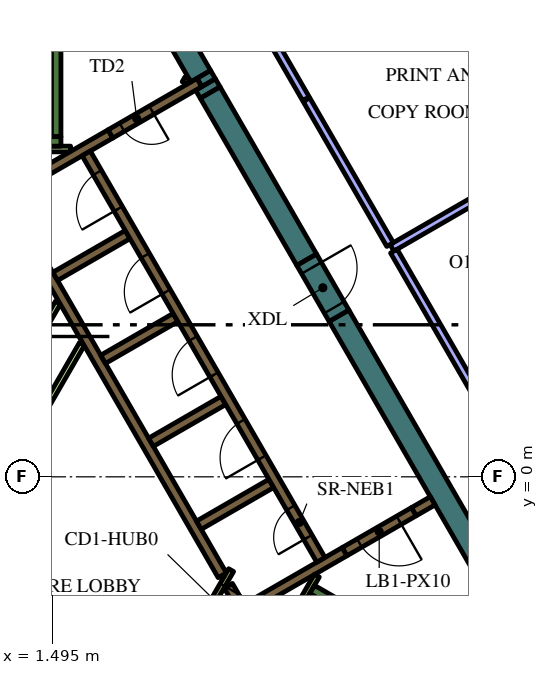
"""IFC4 building model, lengths in metres.
Left out: names, types, materials, properties, quantities, classifications, styles, units other than length and angle.
Written with IfcOpenShell. Run it as: python <this file> out.ifc"""

import sys

from ifc_helpers import new_model, si_unit, direction, frame, frame_2d, origin, place, context, subcontext, project, spatial, polyline, rectangle, outline, extrude, element, fill, save


model = new_model("IFC4")
c1 = context("Model", 3, precision=1e-05, world=origin(), true_north=direction((0.0, 1.0)))
c2 = subcontext(c1, "Body", "Model", "MODEL_VIEW")
j1 = project(units=[si_unit("LENGTHUNIT", "METRE"), si_unit("PLANEANGLEUNIT", "RADIAN")], contexts=[c1])
p1 = place(None, origin())
s1 = spatial("IfcSite", under=j1, at=p1, CompositionType="ELEMENT")
p2 = place(p1, origin())
s2 = spatial("IfcBuilding", under=s1, at=p2, CompositionType="ELEMENT")
p3 = place(p2, frame((0.0, 0.0, 304.8)))
s3 = spatial("IfcBuildingStorey", under=s2, at=p3, CompositionType="ELEMENT", Elevation=304.8)
p4 = place(p3, frame((9.042, 4.239, 0.0), z_axis=(0.0, 0.0, 1.0), x_axis=(0.500005785455, -0.866022063525, 0.0)))
e1 = element("IfcWall", 1, at=p4, inside=s3, PredefinedType="SOLIDWALL", context=c2, shape_type="SweptSolid", body=[
    extrude(rectangle(XDim=12.406, YDim=0.6, at=frame_2d((6.203, 0.0))), origin(), (0.0, 0.0, 1.0), 4.2),
])
p5 = place(p3, frame((5.529, 10.324, 0.0), z_axis=(0.0, 0.0, 1.0), x_axis=(0.499122205112, -0.866531606097, 0.0)))
e2 = element("IfcWall", 2, at=p5, inside=s3, PredefinedType="SOLIDWALL", context=c2, shape_type="SweptSolid", body=[
    extrude(rectangle(XDim=0.247, YDim=0.6, at=frame_2d((0.123, 0.0))), origin(), (0.0, 0.0, 1.0), 4.2),
])
p6 = place(p3, frame((1.989, 16.456, 0.0), z_axis=(0.0, 0.0, 1.0), x_axis=(0.499973159588, -0.866040899549, 0.0)))
e3 = element("IfcWall", 3, at=p6, inside=s3, PredefinedType="SOLIDWALL", context=c2, shape_type="SweptSolid", body=[
    extrude(rectangle(XDim=6.828, YDim=0.6, at=frame_2d((3.414, 0.0))), origin(), (0.0, 0.0, 1.0), 4.2),
])
p7 = place(p3, origin())
e4 = element("IfcWall", 4, at=p7, inside=s3, PredefinedType="SOLIDWALL", context=c2, shape_type="SweptSolid", body=[
    extrude(outline(polyline([(5.664, 10.691), (5.788, 10.476), (5.432, 10.271), (5.308, 10.486), (5.664, 10.691)])), origin(), (0.0, 0.0, 1.0), 4.2),
])
p8 = place(p3, frame((8.192, 5.711, 0.0), z_axis=(0.0, 0.0, 1.0), x_axis=(-0.500006836656, 0.866021456604, 0.0)))
e5 = element("IfcWall", 5, at=p8, inside=s3, PredefinedType="SOLIDWALL", context=c2, shape_type="SweptSolid", body=[
    extrude(rectangle(XDim=5.078, YDim=0.6, at=frame_2d((2.539, 0.0))), origin(), (0.0, 0.0, 1.0), 4.2),
])
p9 = place(p3, frame((8.334, -2.964, 0.0), z_axis=(0.0, 0.0, 1.0), x_axis=(0.866016039709, -0.500016218704, 0.0)))
e6 = element("IfcWall", 6, at=p9, inside=s3, PredefinedType="SOLIDWALL", context=c2, shape_type="SweptSolid", body=[
    extrude(rectangle(XDim=7.05, YDim=0.25, at=frame_2d((3.525, 0.0))), origin(), (0.0, 0.0, 1.0), 4.2),
])
p10 = place(p3, frame((8.168, -3.503, 0.0), z_axis=(0.0, 0.0, 1.0), x_axis=(0.49972245349, 0.866185586049, 0.0)))
e7 = element("IfcWall", 7, at=p10, inside=s3, PredefinedType="SOLIDWALL", context=c2, shape_type="SweptSolid", body=[
    extrude(rectangle(XDim=0.425, YDim=0.25, at=frame_2d((0.212, 0.0))), origin(), (0.0, 0.0, 1.0), 4.2),
])
p11 = place(p3, frame((1.6, 8.95, 0.0), z_axis=(0.0, 0.0, 1.0), x_axis=(0.0, 1.0, 0.0)))
e8 = element("IfcWall", 8, at=p11, inside=s3, PredefinedType="SOLIDWALL", context=c2, shape_type="SweptSolid", body=[
    extrude(rectangle(XDim=6.8, YDim=0.25, at=frame_2d((3.4, 0.0))), origin(), (0.0, 0.0, 1.0), 4.2),
])
p12 = place(p3, frame((1.05, 8.825, 0.0), z_axis=(0.0, 0.0, 1.0), x_axis=(1.0, 0.0, 0.0)))
e9 = element("IfcWall", 9, at=p12, inside=s3, PredefinedType="SOLIDWALL", context=c2, shape_type="SweptSolid", body=[
    extrude(rectangle(XDim=0.675, YDim=0.25, at=frame_2d((0.337, 0.0))), origin(), (0.0, 0.0, 1.0), 4.2),
])
p13 = place(p3, frame((9.19, -1.969, 0.0), z_axis=(0.0, 0.0, 1.0), x_axis=(-0.866057109641, -0.499945079824, 0.0)))
e10 = element("IfcWall", 10, at=p13, inside=s3, PredefinedType="SOLIDWALL", context=c2, shape_type="SweptSolid", body=[
    extrude(rectangle(XDim=3.291, YDim=0.25, at=frame_2d((1.646, 0.0))), origin(), (0.0, 0.0, 1.0), 4.2),
])
p14 = place(p3, frame((6.13, -2.867, 0.0), z_axis=(0.0, 0.0, 1.0), x_axis=(0.500160776593, -0.865932559475, 0.0)))
e11 = element("IfcWall", 11, at=p14, inside=s3, PredefinedType="SOLIDWALL", context=c2, shape_type="SweptSolid", body=[
    extrude(rectangle(XDim=0.627, YDim=0.25, at=frame_2d((0.313, 0.0))), origin(), (0.0, 0.0, 1.0), 4.2),
])
p15 = place(p3, frame((11.507, -0.631, 0.0), z_axis=(0.0, 0.0, 1.0), x_axis=(-0.866093731455, -0.499881634324, 0.0)))
e12 = element("IfcWall", 12, at=p15, inside=s3, PredefinedType="SOLIDWALL", context=c2, shape_type="SweptSolid", body=[
    extrude(rectangle(XDim=0.575, YDim=0.25, at=frame_2d((0.288, 0.0))), origin(), (0.0, 0.0, 1.0), 4.2),
])
p16 = place(p3, frame((3.028, 9.023, 0.0), z_axis=(0.0, 0.0, 1.0), x_axis=(-0.866036587186, -0.49998062928, 0.0)))
e13 = element("IfcWall", 13, at=p16, inside=s3, PredefinedType="SOLIDWALL", context=c2, shape_type="SweptSolid", body=[
    extrude(rectangle(XDim=3.384, YDim=0.25, at=frame_2d((1.692, 0.0))), origin(), (0.0, 0.0, 1.0), 4.2),
])
p17 = place(p3, frame((5.97, -2.591, 0.0), z_axis=(0.0, 0.0, 1.0), x_axis=(-0.499994469932, 0.866028596547, 0.0)))
e14 = element("IfcWall", 14, at=p17, inside=s3, PredefinedType="SOLIDWALL", context=c2, shape_type="SweptSolid", body=[
    extrude(rectangle(XDim=10.488, YDim=0.25, at=frame_2d((5.244, 0.0))), origin(), (0.0, 0.0, 1.0), 4.2),
])
p18 = place(p3, frame((1.574, 5.274, 0.0), z_axis=(0.0, 0.0, 1.0), x_axis=(0.866028486751, 0.499994660107, 0.0)))
e15 = element("IfcWall", 15, at=p18, inside=s3, PredefinedType="SOLIDWALL", context=c2, shape_type="SweptSolid", body=[
    extrude(rectangle(XDim=2.2, YDim=0.25, at=frame_2d((1.1, 0.0))), origin(), (0.0, 0.0, 1.0), 4.2),
])
for number, where, z_axis, x_axis in (
    (16, (2.834, 3.091, 0.0), (0.0, 0.0, 1.0), (0.866, 0.5, 0.0)),
    (17, (4.094, 0.909, 0.0), (0.0, 0.0, 1.0), (0.866, 0.5, 0.0)),
    (18, (5.354, -1.274, 0.0), (0.0, 0.0, 1.0), (0.866, 0.5, 0.0)),
):
    element("IfcWall", number, at=place(p3, frame(where, z_axis=z_axis, x_axis=x_axis)), inside=s3, PredefinedType="SOLIDWALL", context=c2, shape_type="SweptSolid", body=[
        extrude(rectangle(XDim=2.2, YDim=0.25, at=frame_2d((1.1, 0.0))), origin(), (0.0, 0.0, 1.0), 4.2),
    ])
p19 = place(p3, frame((1.05, 8.625, 0.0), z_axis=(0.0, 0.0, 1.0), x_axis=(1.0, 0.0, 0.0)))
e19 = element("IfcWall", 19, at=p19, inside=s3, PredefinedType="PARTITIONING", context=c2, shape_type="SweptSolid", body=[
    extrude(rectangle(XDim=0.929, YDim=0.15, at=frame_2d((0.464, 0.0))), origin(), (0.0, 0.0, 1.0), 3.55),
])
p20 = place(p3, frame((4.98, 10.358, 0.0), z_axis=(0.0, 0.0, 1.0), x_axis=(0.500640202437, 0.86565546709, 0.0)))
e20 = element("IfcWall", 20, at=p20, inside=s3, PredefinedType="PARTITIONING", context=c2, shape_type="SweptSolid", body=[
    extrude(rectangle(XDim=0.146, YDim=0.15, at=frame_2d((0.073, 0.0))), origin(), (0.0, 0.0, 1.0), 3.55),
])
p21 = place(p3, frame((8.459, -2.599, 0.0), z_axis=(0.0, 0.0, 1.0), x_axis=(-0.500041054325, -0.866001699761, 0.0)))
e21 = element("IfcWall", 21, at=p21, inside=s3, PredefinedType="PARTITIONING", context=c2, shape_type="SweptSolid", body=[
    extrude(rectangle(XDim=0.929, YDim=0.15, at=frame_2d((0.464, 0.0))), origin(), (0.0, 0.0, 1.0), 4.2),
])
p22 = place(p3, frame((-1.887, -3.718, 0.0), z_axis=(0.0, 0.0, 1.0), x_axis=(0.500005008002, 0.866022512394, 0.0)))
e22 = element("IfcWall", 22, at=p22, inside=s3, PredefinedType="PARTITIONING", context=c2, shape_type="SweptSolid", body=[
    extrude(rectangle(XDim=8.327, YDim=0.15, at=frame_2d((4.164, 0.0))), origin(), (0.0, 0.0, 1.0), 3.55),
])
p23 = place(p3, frame((-0.3, 1.212, 0.0), z_axis=(0.0, 0.0, 1.0), x_axis=(0.499963101113, 0.866046706318, 0.0)))
e23 = element("IfcWall", 23, at=p23, inside=s3, PredefinedType="PARTITIONING", context=c2, shape_type="SweptSolid", body=[
    extrude(rectangle(XDim=3.893, YDim=0.15, at=frame_2d((1.947, 0.0))), origin(), (0.0, 0.0, 1.0), 3.55),
])
p24 = place(p3, frame((8.565, -2.185, 0.0), z_axis=(0.0, 0.0, 1.0), x_axis=(-0.499997954832, 0.866026584559, 0.0)))
e24 = element("IfcWall", 24, at=p24, inside=s3, PredefinedType="SOLIDWALL", context=c2, shape_type="SweptSolid", body=[
    extrude(rectangle(XDim=12.35, YDim=0.25, at=frame_2d((6.175, 0.0))), origin(), (0.0, 0.0, 1.0), 4.2),
])
p25 = place(p24, frame((0.685, 0.0, 0.0)))
e25 = element("IfcOpeningElement", 25, at=p25, cuts=e24, PredefinedType="OPENING", context=c2, shape_type="SweptSolid", body=[
    extrude(rectangle(XDim=0.9, YDim=2.1, at=frame_2d((0.45, 1.05))), frame((0.0, 0.135, 0.0), z_axis=(0.0, -1.0, 0.0), x_axis=(1.0, 0.0, 0.0)), (0.0, 0.0, 1.0), 0.27),
])
p26 = place(p24, frame((3.105, 0.0, 0.0)))
e26 = element("IfcOpeningElement", 26, at=p26, cuts=e24, PredefinedType="OPENING", context=c2, shape_type="SweptSolid", body=[
    extrude(rectangle(XDim=1.1, YDim=2.1, at=frame_2d((0.55, 1.05))), frame((0.0, 0.135, 0.0), z_axis=(0.0, -1.0, 0.0), x_axis=(1.0, 0.0, 0.0)), (0.0, 0.0, 1.0), 0.27),
])
p27 = place(p24, frame((5.625, 0.0, 0.0)))
e27 = element("IfcOpeningElement", 27, at=p27, cuts=e24, PredefinedType="OPENING", context=c2, shape_type="SweptSolid", body=[
    extrude(rectangle(XDim=1.1, YDim=2.1, at=frame_2d((0.55, 1.05))), frame((0.0, 0.135, 0.0), z_axis=(0.0, -1.0, 0.0), x_axis=(1.0, 0.0, 0.0)), (0.0, 0.0, 1.0), 0.27),
])
p28 = place(p24, frame((8.145, 0.0, 0.0)))
e28 = element("IfcOpeningElement", 28, at=p28, cuts=e24, PredefinedType="OPENING", context=c2, shape_type="SweptSolid", body=[
    extrude(rectangle(XDim=1.1, YDim=2.1, at=frame_2d((0.55, 1.05))), frame((0.0, 0.135, 0.0), z_axis=(0.0, -1.0, 0.0), x_axis=(1.0, 0.0, 0.0)), (0.0, 0.0, 1.0), 0.27),
])
p29 = place(p24, frame((10.665, 0.0, 0.0)))
e29 = element("IfcOpeningElement", 29, at=p29, cuts=e24, PredefinedType="OPENING", context=c2, shape_type="SweptSolid", body=[
    extrude(rectangle(XDim=1.1, YDim=2.1, at=frame_2d((0.55, 1.05))), frame((0.0, 0.135, 0.0), z_axis=(0.0, -1.0, 0.0), x_axis=(1.0, 0.0, 0.0)), (0.0, 0.0, 1.0), 0.27),
])
p30 = place(p3, frame((5.366, 10.373, 0.0), z_axis=(0.0, 0.0, 1.0), x_axis=(-0.866019956843, -0.50000943426, 0.0)))
e30 = element("IfcWall", 30, at=p30, inside=s3, PredefinedType="SOLIDWALL", context=c2, shape_type="SweptSolid", body=[
    extrude(rectangle(XDim=2.7, YDim=0.25, at=frame_2d((1.35, 0.0))), origin(), (0.0, 0.0, 1.0), 4.2),
])
p31 = place(p30, frame((1.45, 0.0, 0.0)))
e31 = element("IfcOpeningElement", 31, at=p31, cuts=e30, PredefinedType="OPENING", context=c2, shape_type="SweptSolid", body=[
    extrude(rectangle(XDim=0.9, YDim=2.1, at=frame_2d((0.45, 1.05))), frame((0.0, 0.135, 0.0), z_axis=(0.0, -1.0, 0.0), x_axis=(1.0, 0.0, 0.0)), (0.0, 0.0, 1.0), 0.27),
])
p32 = place(p3, frame((6.203, -2.456, 0.0), z_axis=(0.0, 0.0, 1.0), x_axis=(-0.500043961785, -0.866000020948, 0.0)))
e32 = element("IfcWall", 32, at=p32, inside=s3, PredefinedType="PARTITIONING", context=c2, shape_type="SweptSolid", body=[
    extrude(rectangle(XDim=1.95, YDim=0.15, at=frame_2d((0.975, 0.0))), origin(), (0.0, 0.0, 1.0), 4.2),
])
p33 = place(p32, frame((0.45, 0.0, 0.0)))
e33 = element("IfcOpeningElement", 33, at=p33, cuts=e32, PredefinedType="OPENING", context=c2, shape_type="SweptSolid", body=[
    extrude(rectangle(XDim=0.9, YDim=2.1, at=frame_2d((0.45, 1.05))), frame((0.0, 0.085, 0.0), z_axis=(0.0, -1.0, 0.0), x_axis=(1.0, 0.0, 0.0)), (0.0, 0.0, 1.0), 0.17),
])
p34 = place(p3, frame((11.009, -0.919, 0.0), z_axis=(0.0, 0.0, 1.0), x_axis=(-0.866059744384, -0.49994051562, 0.0)))
e34 = element("IfcWall", 34, at=p34, inside=s3, PredefinedType="SOLIDWALL", context=c2, shape_type="SweptSolid", body=[
    extrude(rectangle(XDim=2.1, YDim=0.25, at=frame_2d((1.05, 0.0))), origin(), (0.0, 0.0, 1.0), 4.2),
])
p35 = place(p34, frame((0.45, 0.0, 0.0)))
e35 = element("IfcOpeningElement", 35, at=p35, cuts=e34, PredefinedType="OPENING", context=c2, shape_type="SweptSolid", body=[
    extrude(rectangle(XDim=1.2, YDim=2.1, at=frame_2d((0.6, 1.05))), frame((0.0, 0.135, 0.0), z_axis=(0.0, -1.0, 0.0), x_axis=(1.0, 0.0, 0.0)), (0.0, 0.0, 1.0), 0.27),
])
p36 = place(p3, frame((8.192, 5.711, 0.0), z_axis=(0.0, 0.0, 1.0), x_axis=(0.500062241894, -0.865989465428, 0.0)))
e36 = element("IfcWall", 36, at=p36, inside=s3, PredefinedType="SOLIDWALL", context=c2, shape_type="SweptSolid", body=[
    extrude(rectangle(XDim=1.7, YDim=0.6, at=frame_2d((0.85, 0.0))), origin(), (0.0, 0.0, 1.0), 4.2),
])
p37 = place(p36, frame((0.25, 0.0, 0.0)))
e37 = element("IfcOpeningElement", 37, at=p37, cuts=e36, PredefinedType="OPENING", context=c2, shape_type="SweptSolid", body=[
    extrude(rectangle(XDim=1.2, YDim=2.1, at=frame_2d((0.6, 1.05))), frame((0.0, 0.31, 0.0), z_axis=(0.0, -1.0, 0.0), x_axis=(1.0, 0.0, 0.0)), (0.0, 0.0, 1.0), 0.62),
])
p38 = place(p3, frame((10.436, 6.025, 0.0), z_axis=(0.0, 0.0, 1.0), x_axis=(0.866030664334, 0.49999088835, 0.0)))
e38 = element("IfcWall", 38, at=p38, inside=s3, PredefinedType="PARTITIONING", context=c2, shape_type="SweptSolid", body=[
    extrude(rectangle(XDim=3.49, YDim=0.2, at=frame_2d((1.745, 0.0))), origin(), (0.0, 0.0, 1.0), 3.55),
])
for number, where, z_axis, x_axis in (
    (39, (12.686, 2.128, 0.0), (0.0, 0.0, 1.0), (-0.5, 0.866, 0.0)),
    (40, (10.385, 6.112, 0.0), (0.0, 0.0, 1.0), (-0.5, 0.866, 0.0)),
):
    element("IfcWall", number, at=place(p3, frame(where, z_axis=z_axis, x_axis=x_axis)), inside=s3, PredefinedType="PARTITIONING", context=c2, shape_type="SweptSolid", body=[
        extrude(rectangle(XDim=4.4, YDim=0.2, at=frame_2d((2.2, 0.0))), origin(), (0.0, 0.0, 1.0), 3.55),
    ])
p39 = place(p3, frame((8.171, 9.948, 0.0), z_axis=(0.0, 0.0, 1.0), x_axis=(-0.500044545065, 0.865999684151, 0.0)))
e41 = element("IfcWall", 41, at=p39, inside=s3, PredefinedType="PARTITIONING", context=c2, shape_type="SweptSolid", body=[
    extrude(rectangle(XDim=1.815, YDim=0.2, at=frame_2d((0.908, 0.0))), origin(), (0.0, 0.0, 1.0), 3.55),
])
p40 = place(p25, origin())
e42 = element("IfcDoor", 42, at=p40, inside=s3, OperationType="SINGLE_SWING_LEFT", PredefinedType="DOOR", context=c2, shape_type="SweptSolid", body=[
    extrude(rectangle(XDim=0.9, YDim=2.1, at=frame_2d((0.45, 1.05))), frame((0.0, 0.025, 0.0), z_axis=(0.0, -1.0, 0.0), x_axis=(1.0, 0.0, 0.0)), (0.0, 0.0, 1.0), 0.05),
])
fill(e25, e42)
p41 = place(p26, origin())
e43 = element("IfcDoor", 43, at=p41, inside=s3, OperationType="DOUBLE_DOOR_SLIDING", PredefinedType="DOOR", context=c2, shape_type="SweptSolid", body=[
    extrude(rectangle(XDim=1.1, YDim=2.1, at=frame_2d((0.55, 1.05))), frame((0.0, 0.025, 0.0), z_axis=(0.0, -1.0, 0.0), x_axis=(1.0, 0.0, 0.0)), (0.0, 0.0, 1.0), 0.05),
])
fill(e26, e43)
p42 = place(p27, origin())
e44 = element("IfcDoor", 44, at=p42, inside=s3, OperationType="DOUBLE_DOOR_SLIDING", PredefinedType="DOOR", context=c2, shape_type="SweptSolid", body=[
    extrude(rectangle(XDim=1.1, YDim=2.1, at=frame_2d((0.55, 1.05))), frame((0.0, 0.025, 0.0), z_axis=(0.0, -1.0, 0.0), x_axis=(1.0, 0.0, 0.0)), (0.0, 0.0, 1.0), 0.05),
])
fill(e27, e44)
p43 = place(p28, origin())
e45 = element("IfcDoor", 45, at=p43, inside=s3, OperationType="DOUBLE_DOOR_SLIDING", PredefinedType="DOOR", context=c2, shape_type="SweptSolid", body=[
    extrude(rectangle(XDim=1.1, YDim=2.1, at=frame_2d((0.55, 1.05))), frame((0.0, 0.025, 0.0), z_axis=(0.0, -1.0, 0.0), x_axis=(1.0, 0.0, 0.0)), (0.0, 0.0, 1.0), 0.05),
])
fill(e28, e45)
p44 = place(p29, origin())
e46 = element("IfcDoor", 46, at=p44, inside=s3, OperationType="DOUBLE_DOOR_SLIDING", PredefinedType="DOOR", context=c2, shape_type="SweptSolid", body=[
    extrude(rectangle(XDim=1.1, YDim=2.1, at=frame_2d((0.55, 1.05))), frame((0.0, 0.025, 0.0), z_axis=(0.0, -1.0, 0.0), x_axis=(1.0, 0.0, 0.0)), (0.0, 0.0, 1.0), 0.05),
])
fill(e29, e46)
p45 = place(p31, origin())
e47 = element("IfcDoor", 47, at=p45, inside=s3, OperationType="SINGLE_SWING_LEFT", PredefinedType="DOOR", context=c2, shape_type="SweptSolid", body=[
    extrude(rectangle(XDim=0.9, YDim=2.1, at=frame_2d((0.45, 1.05))), frame((0.0, 0.025, 0.0), z_axis=(0.0, -1.0, 0.0), x_axis=(1.0, 0.0, 0.0)), (0.0, 0.0, 1.0), 0.05),
])
fill(e31, e47)
p46 = place(p33, origin())
e48 = element("IfcDoor", 48, at=p46, inside=s3, OperationType="SINGLE_SWING_LEFT", PredefinedType="DOOR", context=c2, shape_type="SweptSolid", body=[
    extrude(rectangle(XDim=0.9, YDim=2.1, at=frame_2d((0.45, 1.05))), frame((0.0, 0.025, 0.0), z_axis=(0.0, -1.0, 0.0), x_axis=(1.0, 0.0, 0.0)), (0.0, 0.0, 1.0), 0.05),
])
fill(e33, e48)
p47 = place(p35, origin())
e49 = element("IfcDoor", 49, at=p47, inside=s3, OperationType="SINGLE_SWING_LEFT", PredefinedType="DOOR", context=c2, shape_type="SweptSolid", body=[
    extrude(rectangle(XDim=1.2, YDim=2.1, at=frame_2d((0.6, 1.05))), frame((0.0, 0.025, 0.0), z_axis=(0.0, -1.0, 0.0), x_axis=(1.0, 0.0, 0.0)), (0.0, 0.0, 1.0), 0.05),
])
fill(e35, e49)
p48 = place(p37, origin())
e50 = element("IfcDoor", 50, at=p48, inside=s3, OperationType="SINGLE_SWING_LEFT", PredefinedType="DOOR", context=c2, shape_type="SweptSolid", body=[
    extrude(rectangle(XDim=1.2, YDim=2.1, at=frame_2d((0.6, 1.05))), frame((0.0, 0.025, 0.0), z_axis=(0.0, -1.0, 0.0), x_axis=(1.0, 0.0, 0.0)), (0.0, 0.0, 1.0), 0.05),
])
fill(e37, e50)
save(model, sys.argv[1])
